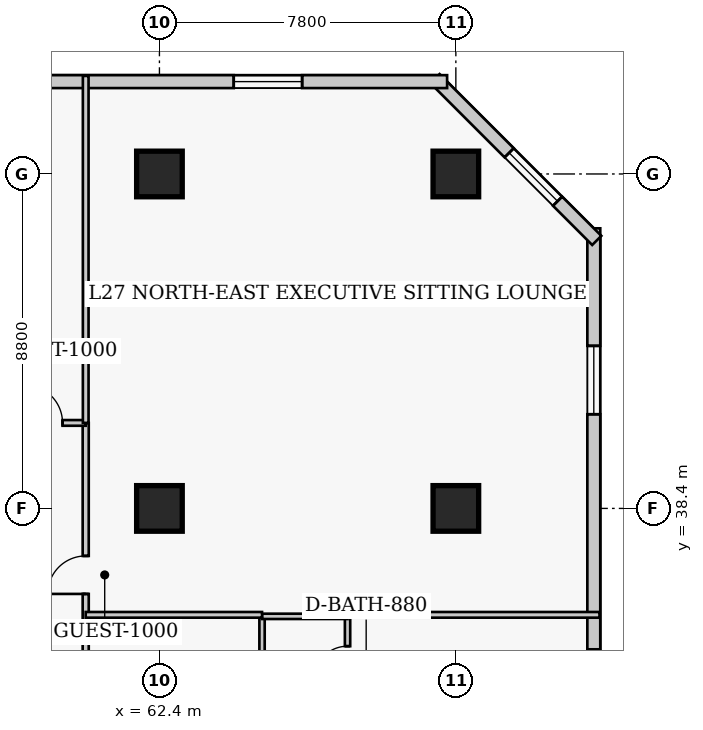
"""IFC4 building model, lengths in metres.
Left out: names, types, materials, properties, quantities, classifications, styles, units other than length and angle.
Written with IfcOpenShell. Run it as: python <this file> out.ifc"""

import sys

from ifc_helpers import new_model, si_unit, direction, frame, frame_2d, origin, origin_2d, place, context, subcontext, project, spatial, rectangle, extrude, element, fill, save


model = new_model("IFC4")
c1 = context("Model", 3, precision=1e-05, world=origin(), true_north=direction((0.0, 1.0)))
c2 = subcontext(c1, "Body", "Model", "MODEL_VIEW")
j1 = project(units=[si_unit("LENGTHUNIT", "METRE"), si_unit("PLANEANGLEUNIT", "RADIAN")], contexts=[c1])
p1 = place(None, origin())
s1 = spatial("IfcSite", under=j1, at=p1, CompositionType="ELEMENT")
p2 = place(p1, origin())
s2 = spatial("IfcBuilding", under=s1, at=p2, CompositionType="ELEMENT")
p3 = place(p2, frame((0.0, 0.0, 110.8)))
s3 = spatial("IfcBuildingStorey", under=s2, at=p3, CompositionType="ELEMENT", Elevation=110.8)
for number, where, z_axis, x_axis in (
    (1, (62.4, 38.4, 0.0), (0.0, 0.0, 1.0), (1.0, 0.0, 0.0)),
    (2, (62.4, 47.2, 0.0), (0.0, 0.0, 1.0), (1.0, 0.0, 0.0)),
    (3, (70.2, 38.4, 0.0), (0.0, 0.0, 1.0), (1.0, 0.0, 0.0)),
    (4, (70.2, 47.2, 0.0), (0.0, 0.0, 1.0), (1.0, 0.0, 0.0)),
):
    element("IfcColumn", number, at=place(p3, frame(where, z_axis=z_axis, x_axis=x_axis)), inside=s3, PredefinedType="COLUMN", context=c2, shape_type="SweptSolid", body=[
        extrude(rectangle(XDim=1.2, YDim=1.2, at=origin_2d()), origin(), (0.0, 0.0, 1.0), 3.8),
    ])
p4 = place(p3, frame((73.83, 13.83, 0.0), z_axis=(0.0, 0.0, 1.0), x_axis=(0.0, 1.0, 0.0)))
e5 = element("IfcWall", 5, at=p4, inside=s3, PredefinedType="SOLIDWALL", context=c2, shape_type="SweptSolid", body=[
    extrude(rectangle(XDim=31.94, YDim=0.34, at=frame_2d((15.97, 0.0))), origin(), (0.0, 0.0, 1.0), 3.54),
])
p5 = place(p4, frame((3.093, 0.0, 0.85)))
e6 = element("IfcOpeningElement", 6, at=p5, cuts=e5, PredefinedType="OPENING", context=c2, shape_type="SweptSolid", body=[
    extrude(rectangle(XDim=1.8, YDim=1.8, at=frame_2d((0.9, 0.9))), frame((0.0, 0.18, 0.0), z_axis=(0.0, -1.0, 0.0), x_axis=(1.0, 0.0, 0.0)), (0.0, 0.0, 1.0), 0.36),
])
p6 = place(p4, frame((11.077, 0.0, 0.85)))
e7 = element("IfcOpeningElement", 7, at=p6, cuts=e5, PredefinedType="OPENING", context=c2, shape_type="SweptSolid", body=[
    extrude(rectangle(XDim=1.8, YDim=1.8, at=frame_2d((0.9, 0.9))), frame((0.0, 0.18, 0.0), z_axis=(0.0, -1.0, 0.0), x_axis=(1.0, 0.0, 0.0)), (0.0, 0.0, 1.0), 0.36),
])
p7 = place(p4, frame((19.062, 0.0, 0.85)))
e8 = element("IfcOpeningElement", 8, at=p7, cuts=e5, PredefinedType="OPENING", context=c2, shape_type="SweptSolid", body=[
    extrude(rectangle(XDim=1.8, YDim=1.8, at=frame_2d((0.9, 0.9))), frame((0.0, 0.18, 0.0), z_axis=(0.0, -1.0, 0.0), x_axis=(1.0, 0.0, 0.0)), (0.0, 0.0, 1.0), 0.36),
])
p8 = place(p4, frame((27.048, 0.0, 0.85)))
e9 = element("IfcOpeningElement", 9, at=p8, cuts=e5, PredefinedType="OPENING", context=c2, shape_type="SweptSolid", body=[
    extrude(rectangle(XDim=1.8, YDim=1.8, at=frame_2d((0.9, 0.9))), frame((0.0, 0.18, 0.0), z_axis=(0.0, -1.0, 0.0), x_axis=(1.0, 0.0, 0.0)), (0.0, 0.0, 1.0), 0.36),
])
p9 = place(p3, frame((73.908, 45.451, 0.0), z_axis=(0.0, 0.0, 1.0), x_axis=(-0.707106781187, 0.707106781187, 0.0)))
e10 = element("IfcWall", 10, at=p9, inside=s3, PredefinedType="SOLIDWALL", context=c2, shape_type="SweptSolid", body=[
    extrude(rectangle(XDim=6.02, YDim=0.34, at=frame_2d((3.01, 0.0))), origin(), (0.0, 0.0, 1.0), 3.54),
])
p10 = place(p9, frame((1.46, 0.0, 0.85)))
e11 = element("IfcOpeningElement", 11, at=p10, cuts=e10, PredefinedType="OPENING", context=c2, shape_type="SweptSolid", body=[
    extrude(rectangle(XDim=1.8, YDim=1.8, at=frame_2d((0.9, 0.9))), frame((0.0, 0.18, 0.0), z_axis=(0.0, -1.0, 0.0), x_axis=(1.0, 0.0, 0.0)), (0.0, 0.0, 1.0), 0.36),
])
p11 = place(p3, frame((69.97, 49.63, 0.0), z_axis=(0.0, 0.0, 1.0), x_axis=(-1.0, 0.0, 0.0)))
e12 = element("IfcWall", 12, at=p11, inside=s3, PredefinedType="SOLIDWALL", context=c2, shape_type="SweptSolid", body=[
    extrude(rectangle(XDim=28.29, YDim=0.34, at=frame_2d((14.145, 0.0))), origin(), (0.0, 0.0, 1.0), 3.54),
])
p12 = place(p11, frame((3.815, 0.0, 0.85)))
e13 = element("IfcOpeningElement", 13, at=p12, cuts=e12, PredefinedType="OPENING", context=c2, shape_type="SweptSolid", body=[
    extrude(rectangle(XDim=1.8, YDim=1.8, at=frame_2d((0.9, 0.9))), frame((0.0, 0.18, 0.0), z_axis=(0.0, -1.0, 0.0), x_axis=(1.0, 0.0, 0.0)), (0.0, 0.0, 1.0), 0.36),
])
p13 = place(p11, frame((13.245, 0.0, 0.85)))
e14 = element("IfcOpeningElement", 14, at=p13, cuts=e12, PredefinedType="OPENING", context=c2, shape_type="SweptSolid", body=[
    extrude(rectangle(XDim=1.8, YDim=1.8, at=frame_2d((0.9, 0.9))), frame((0.0, 0.18, 0.0), z_axis=(0.0, -1.0, 0.0), x_axis=(1.0, 0.0, 0.0)), (0.0, 0.0, 1.0), 0.36),
])
p14 = place(p11, frame((22.675, 0.0, 0.85)))
e15 = element("IfcOpeningElement", 15, at=p14, cuts=e12, PredefinedType="OPENING", context=c2, shape_type="SweptSolid", body=[
    extrude(rectangle(XDim=1.8, YDim=1.8, at=frame_2d((0.9, 0.9))), frame((0.0, 0.18, 0.0), z_axis=(0.0, -1.0, 0.0), x_axis=(1.0, 0.0, 0.0)), (0.0, 0.0, 1.0), 0.36),
])
p15 = place(p3, frame((60.46, 11.85, 0.0), z_axis=(0.0, 0.0, 1.0), x_axis=(0.0, 1.0, 0.0)))
e16 = element("IfcWall", 16, at=p15, inside=s3, PredefinedType="PARTITIONING", context=c2, shape_type="SweptSolid", body=[
    extrude(rectangle(XDim=28.8, YDim=0.16, at=frame_2d((14.4, 0.0))), origin(), (0.0, 0.0, 1.0), 3.54),
])
p16 = place(p15, frame((3.6, 0.0, 0.0)))
e17 = element("IfcOpeningElement", 17, at=p16, cuts=e16, PredefinedType="OPENING", context=c2, shape_type="SweptSolid", body=[
    extrude(rectangle(XDim=0.95, YDim=2.1, at=frame_2d((0.475, 1.05))), frame((0.0, 0.09, 0.0), z_axis=(0.0, -1.0, 0.0), x_axis=(1.0, 0.0, 0.0)), (0.0, 0.0, 1.0), 0.18),
])
p17 = place(p15, frame((12.075, 0.0, 0.0)))
e18 = element("IfcOpeningElement", 18, at=p17, cuts=e16, PredefinedType="OPENING", context=c2, shape_type="SweptSolid", body=[
    extrude(rectangle(XDim=0.95, YDim=2.1, at=frame_2d((0.475, 1.05))), frame((0.0, 0.09, 0.0), z_axis=(0.0, -1.0, 0.0), x_axis=(1.0, 0.0, 0.0)), (0.0, 0.0, 1.0), 0.18),
])
p18 = place(p15, frame((19.875, 0.0, 0.0)))
e19 = element("IfcOpeningElement", 19, at=p18, cuts=e16, PredefinedType="OPENING", context=c2, shape_type="SweptSolid", body=[
    extrude(rectangle(XDim=0.95, YDim=2.1, at=frame_2d((0.475, 1.05))), frame((0.0, 0.09, 0.0), z_axis=(0.0, -1.0, 0.0), x_axis=(1.0, 0.0, 0.0)), (0.0, 0.0, 1.0), 0.18),
])
p19 = place(p15, frame((24.3, 0.0, 0.0)))
e20 = element("IfcOpeningElement", 20, at=p19, cuts=e16, PredefinedType="OPENING", context=c2, shape_type="SweptSolid", body=[
    extrude(rectangle(XDim=1.0, YDim=2.15, at=frame_2d((0.5, 1.075))), frame((0.0, 0.09, 0.0), z_axis=(0.0, -1.0, 0.0), x_axis=(1.0, 0.0, 0.0)), (0.0, 0.0, 1.0), 0.18),
])
p20 = place(p3, frame((56.8, 40.65, 0.0), z_axis=(0.0, 0.0, 1.0), x_axis=(1.0, 0.0, 0.0)))
e21 = element("IfcWall", 21, at=p20, inside=s3, PredefinedType="PARTITIONING", context=c2, shape_type="SweptSolid", body=[
    extrude(rectangle(XDim=3.66, YDim=0.15, at=frame_2d((1.83, 0.0))), origin(), (0.0, 0.0, 1.0), 3.54),
])
p21 = place(p20, frame((2.05, 0.0, 0.0)))
e22 = element("IfcOpeningElement", 22, at=p21, cuts=e21, PredefinedType="OPENING", context=c2, shape_type="SweptSolid", body=[
    extrude(rectangle(XDim=1.0, YDim=2.15, at=frame_2d((0.5, 1.075))), frame((0.0, 0.085, 0.0), z_axis=(0.0, -1.0, 0.0), x_axis=(1.0, 0.0, 0.0)), (0.0, 0.0, 1.0), 0.17),
])
p22 = place(p3, frame((60.46, 40.65, 0.0), z_axis=(0.0, 0.0, 1.0), x_axis=(0.0, 1.0, 0.0)))
e23 = element("IfcWall", 23, at=p22, inside=s3, PredefinedType="PARTITIONING", context=c2, shape_type="SweptSolid", body=[
    extrude(rectangle(XDim=9.13, YDim=0.15, at=frame_2d((4.565, 0.0))), origin(), (0.0, 0.0, 1.0), 3.54),
])
p23 = place(p3, frame((65.1, 33.11, 0.0), z_axis=(0.0, 0.0, 1.0), x_axis=(0.0, 1.0, 0.0)))
e24 = element("IfcWall", 24, at=p23, inside=s3, PredefinedType="PLUMBINGWALL", context=c2, shape_type="SweptSolid", body=[
    extrude(rectangle(XDim=2.45, YDim=0.14, at=frame_2d((1.225, 0.0))), origin(), (0.0, 0.0, 1.0), 3.54),
])
p24 = place(p3, frame((67.35, 33.11, 0.0), z_axis=(0.0, 0.0, 1.0), x_axis=(0.0, 1.0, 0.0)))
e25 = element("IfcWall", 25, at=p24, inside=s3, PredefinedType="PLUMBINGWALL", context=c2, shape_type="SweptSolid", body=[
    extrude(rectangle(XDim=2.45, YDim=0.14, at=frame_2d((1.225, 0.0))), origin(), (0.0, 0.0, 1.0), 3.54),
])
p25 = place(p24, frame((0.785, 0.0, 0.0)))
e26 = element("IfcOpeningElement", 26, at=p25, cuts=e25, PredefinedType="OPENING", context=c2, shape_type="SweptSolid", body=[
    extrude(rectangle(XDim=0.88, YDim=2.05, at=frame_2d((0.44, 1.025))), frame((0.0, 0.08, 0.0), z_axis=(0.0, -1.0, 0.0), x_axis=(1.0, 0.0, 0.0)), (0.0, 0.0, 1.0), 0.16),
])
p26 = place(p3, frame((65.1, 35.56, 0.0), z_axis=(0.0, 0.0, 1.0), x_axis=(1.0, 0.0, 0.0)))
e27 = element("IfcWall", 27, at=p26, inside=s3, PredefinedType="PLUMBINGWALL", context=c2, shape_type="SweptSolid", body=[
    extrude(rectangle(XDim=2.25, YDim=0.14, at=frame_2d((1.125, 0.0))), origin(), (0.0, 0.0, 1.0), 3.54),
])
p27 = place(p3, frame((60.46, 35.6, 0.0), z_axis=(0.0, 0.0, 1.0), x_axis=(1.0, 0.0, 0.0)))
e28 = element("IfcWall", 28, at=p27, inside=s3, PredefinedType="PARTITIONING", context=c2, shape_type="SweptSolid", body=[
    extrude(rectangle(XDim=4.64, YDim=0.15, at=frame_2d((2.32, 0.0))), origin(), (0.0, 0.0, 1.0), 3.54),
])
p28 = place(p3, frame((67.35, 35.6, 0.0), z_axis=(0.0, 0.0, 1.0), x_axis=(1.0, 0.0, 0.0)))
e29 = element("IfcWall", 29, at=p28, inside=s3, PredefinedType="PARTITIONING", context=c2, shape_type="SweptSolid", body=[
    extrude(rectangle(XDim=6.63, YDim=0.15, at=frame_2d((3.315, 0.0))), origin(), (0.0, 0.0, 1.0), 3.54),
])
p29 = place(p7, origin())
e30 = element("IfcWindow", 30, at=p29, inside=s3, PartitioningType="SINGLE_PANEL", PredefinedType="WINDOW", context=c2, shape_type="SweptSolid", body=[
    extrude(rectangle(XDim=1.8, YDim=1.8, at=frame_2d((0.9, 0.9))), frame((0.0, 0.03, 0.0), z_axis=(0.0, -1.0, 0.0), x_axis=(1.0, 0.0, 0.0)), (0.0, 0.0, 1.0), 0.06),
])
fill(e8, e30)
p30 = place(p8, origin())
e31 = element("IfcWindow", 31, at=p30, inside=s3, PartitioningType="SINGLE_PANEL", PredefinedType="WINDOW", context=c2, shape_type="SweptSolid", body=[
    extrude(rectangle(XDim=1.8, YDim=1.8, at=frame_2d((0.9, 0.9))), frame((0.0, 0.03, 0.0), z_axis=(0.0, -1.0, 0.0), x_axis=(1.0, 0.0, 0.0)), (0.0, 0.0, 1.0), 0.06),
])
fill(e9, e31)
p31 = place(p10, origin())
e32 = element("IfcWindow", 32, at=p31, inside=s3, PartitioningType="SINGLE_PANEL", PredefinedType="WINDOW", context=c2, shape_type="SweptSolid", body=[
    extrude(rectangle(XDim=1.8, YDim=1.8, at=frame_2d((0.9, 0.9))), frame((0.0, 0.03, 0.0), z_axis=(0.0, -1.0, 0.0), x_axis=(1.0, 0.0, 0.0)), (0.0, 0.0, 1.0), 0.06),
])
fill(e11, e32)
p32 = place(p12, origin())
e33 = element("IfcWindow", 33, at=p32, inside=s3, PartitioningType="SINGLE_PANEL", PredefinedType="WINDOW", context=c2, shape_type="SweptSolid", body=[
    extrude(rectangle(XDim=1.8, YDim=1.8, at=frame_2d((0.9, 0.9))), frame((0.0, 0.03, 0.0), z_axis=(0.0, -1.0, 0.0), x_axis=(1.0, 0.0, 0.0)), (0.0, 0.0, 1.0), 0.06),
])
fill(e13, e33)
p33 = place(p21, origin())
e34 = element("IfcDoor", 34, at=p33, inside=s3, OperationType="SINGLE_SWING_LEFT", PredefinedType="DOOR", context=c2, shape_type="SweptSolid", body=[
    extrude(rectangle(XDim=1.0, YDim=2.15, at=frame_2d((0.5, 1.075))), frame((0.0, 0.025, 0.0), z_axis=(0.0, -1.0, 0.0), x_axis=(1.0, 0.0, 0.0)), (0.0, 0.0, 1.0), 0.05),
])
fill(e22, e34)
p34 = place(p25, origin())
e35 = element("IfcDoor", 35, at=p34, inside=s3, OperationType="SINGLE_SWING_LEFT", PredefinedType="DOOR", context=c2, shape_type="SweptSolid", body=[
    extrude(rectangle(XDim=0.88, YDim=2.05, at=frame_2d((0.44, 1.025))), frame((0.0, 0.025, 0.0), z_axis=(0.0, -1.0, 0.0), x_axis=(1.0, 0.0, 0.0)), (0.0, 0.0, 1.0), 0.05),
])
fill(e26, e35)
p35 = place(p19, origin())
e36 = element("IfcDoor", 36, at=p35, inside=s3, OperationType="SINGLE_SWING_LEFT", PredefinedType="DOOR", context=c2, shape_type="SweptSolid", body=[
    extrude(rectangle(XDim=1.0, YDim=2.15, at=frame_2d((0.5, 1.075))), frame((0.0, 0.025, 0.0), z_axis=(0.0, -1.0, 0.0), x_axis=(1.0, 0.0, 0.0)), (0.0, 0.0, 1.0), 0.05),
])
fill(e20, e36)
save(model, sys.argv[1])
